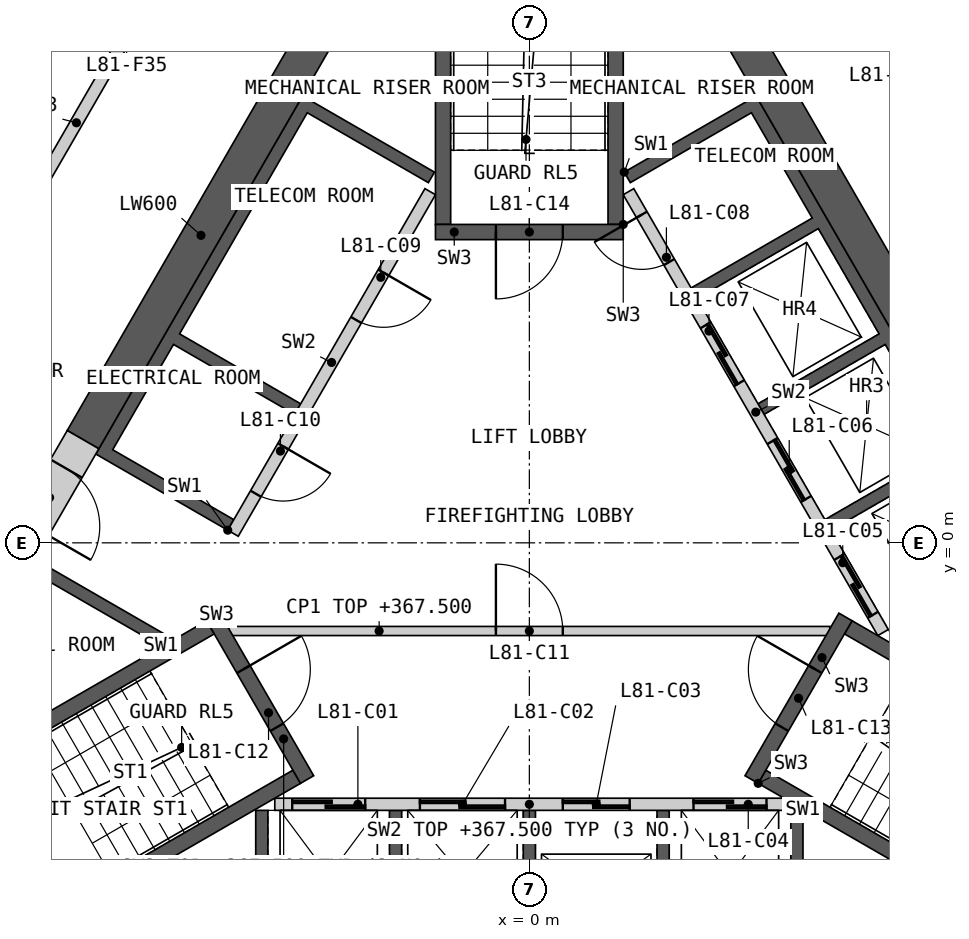
"""IFC4 building model, lengths in metres.
Left out: names, types, materials, properties, quantities, classifications, styles, units other than length and angle.
Written with IfcOpenShell. Run it as: python <this file> out.ifc"""

import sys

from ifc_helpers import new_model, si_unit, direction, frame, frame_2d, origin, place, context, subcontext, project, spatial, polyline, rectangle, outline, extrude, element, fill, save


model = new_model("IFC4")
c1 = context("Model", 3, precision=1e-05, world=origin(), true_north=direction((0.0, 1.0)))
c2 = subcontext(c1, "Body", "Model", "MODEL_VIEW")
j1 = project(units=[si_unit("LENGTHUNIT", "METRE"), si_unit("PLANEANGLEUNIT", "RADIAN")], contexts=[c1])
p1 = place(None, origin())
s1 = spatial("IfcSite", under=j1, at=p1, CompositionType="ELEMENT")
p2 = place(p1, origin())
s2 = spatial("IfcBuilding", under=s1, at=p2, CompositionType="ELEMENT")
p3 = place(p2, frame((0.0, 0.0, 364.4)))
s3 = spatial("IfcBuildingStorey", under=s2, at=p3, CompositionType="ELEMENT", Elevation=364.4)
p4 = place(p3, origin())
e1 = element("IfcWall", 1, at=p4, inside=s3, PredefinedType="SHEAR", context=c2, shape_type="SweptSolid", body=[
    extrude(outline(polyline([(4.5, -4.4), (4.5, -6.906), (-4.5, -6.906), (-4.5, -4.4), (-4.3, -4.4), (-4.3, -6.7), (-2.3, -6.7), (-2.3, -4.4), (-2.1, -4.4), (-2.1, -6.7), (-0.1, -6.7), (-0.1, -4.4), (0.1, -4.4), (0.1, -6.7), (2.1, -6.7), (2.1, -4.4), (2.3, -4.4), (2.3, -6.7), (4.3, -6.7), (4.3, -4.4), (4.5, -4.4)])), origin(), (0.0, 0.0, 1.0), 3.1),
])
p5 = place(p3, frame((-4.187, -4.3, 0.0), z_axis=(0.0, 0.0, 1.0), x_axis=(1.0, 0.0, 0.0)))
e2 = element("IfcWall", 2, at=p5, inside=s3, PredefinedType="SOLIDWALL", context=c2, shape_type="SweptSolid", body=[
    extrude(rectangle(XDim=8.373, YDim=0.2, at=frame_2d((4.187, 0.0))), origin(), (0.0, 0.0, 1.0), 3.1),
])
p6 = place(p5, frame((0.287, 0.0, 0.0)))
e3 = element("IfcOpeningElement", 3, at=p6, cuts=e2, PredefinedType="OPENING", context=c2, shape_type="SweptSolid", body=[
    extrude(rectangle(XDim=1.2, YDim=2.1, at=frame_2d((0.6, 1.05))), frame((0.0, 0.11, 0.0), z_axis=(0.0, -1.0, 0.0), x_axis=(1.0, 0.0, 0.0)), (0.0, 0.0, 1.0), 0.22),
])
p7 = place(p5, frame((2.387, 0.0, 0.0)))
e4 = element("IfcOpeningElement", 4, at=p7, cuts=e2, PredefinedType="OPENING", context=c2, shape_type="SweptSolid", body=[
    extrude(rectangle(XDim=1.4, YDim=2.1, at=frame_2d((0.7, 1.05))), frame((0.0, 0.11, 0.0), z_axis=(0.0, -1.0, 0.0), x_axis=(1.0, 0.0, 0.0)), (0.0, 0.0, 1.0), 0.22),
])
p8 = place(p5, frame((4.737, 0.0, 0.0)))
e5 = element("IfcOpeningElement", 5, at=p8, cuts=e2, PredefinedType="OPENING", context=c2, shape_type="SweptSolid", body=[
    extrude(rectangle(XDim=1.1, YDim=2.1, at=frame_2d((0.55, 1.05))), frame((0.0, 0.11, 0.0), z_axis=(0.0, -1.0, 0.0), x_axis=(1.0, 0.0, 0.0)), (0.0, 0.0, 1.0), 0.22),
])
p9 = place(p5, frame((6.887, 0.0, 0.0)))
e6 = element("IfcOpeningElement", 6, at=p9, cuts=e2, PredefinedType="OPENING", context=c2, shape_type="SweptSolid", body=[
    extrude(rectangle(XDim=1.2, YDim=2.1, at=frame_2d((0.6, 1.05))), frame((0.0, 0.11, 0.0), z_axis=(0.0, -1.0, 0.0), x_axis=(1.0, 0.0, 0.0)), (0.0, 0.0, 1.0), 0.22),
])
p10 = place(p3, origin())
e7 = element("IfcWall", 7, at=p10, inside=s3, PredefinedType="SHEAR", context=c2, shape_type="SweptSolid", body=[
    extrude(outline(polyline([(1.561, 6.097), (3.731, 7.35), (8.231, -0.444), (6.061, -1.697), (5.96, -1.524), (7.952, -0.374), (6.952, 1.358), (4.96, 0.208), (4.861, 0.381), (6.852, 1.531), (5.852, 3.263), (3.861, 2.113), (3.76, 2.287), (5.752, 3.437), (4.752, 5.169), (2.76, 4.019), (2.66, 4.192), (4.652, 5.342), (3.652, 7.074), (1.66, 5.924), (1.561, 6.097)])), origin(), (0.0, 0.0, 1.0), 3.1),
])
p11 = place(p3, frame((5.817, -1.476, 0.0), z_axis=(0.0, 0.0, 1.0), x_axis=(-0.500002616675, 0.866023893041, 0.0)))
e8 = element("IfcWall", 8, at=p11, inside=s3, PredefinedType="SOLIDWALL", context=c2, shape_type="SweptSolid", body=[
    extrude(rectangle(XDim=8.373, YDim=0.2, at=frame_2d((4.187, 0.0))), origin(), (0.0, 0.0, 1.0), 3.1),
])
p12 = place(p11, frame((0.337, 0.0, 0.0)))
e9 = element("IfcOpeningElement", 9, at=p12, cuts=e8, PredefinedType="OPENING", context=c2, shape_type="SweptSolid", body=[
    extrude(rectangle(XDim=1.1, YDim=2.1, at=frame_2d((0.55, 1.05))), frame((0.0, 0.11, 0.0), z_axis=(0.0, -1.0, 0.0), x_axis=(1.0, 0.0, 0.0)), (0.0, 0.0, 1.0), 0.22),
])
p13 = place(p11, frame((2.537, 0.0, 0.0)))
e10 = element("IfcOpeningElement", 10, at=p13, cuts=e8, PredefinedType="OPENING", context=c2, shape_type="SweptSolid", body=[
    extrude(rectangle(XDim=1.1, YDim=2.1, at=frame_2d((0.55, 1.05))), frame((0.0, 0.11, 0.0), z_axis=(0.0, -1.0, 0.0), x_axis=(1.0, 0.0, 0.0)), (0.0, 0.0, 1.0), 0.22),
])
p14 = place(p11, frame((4.737, 0.0, 0.0)))
e11 = element("IfcOpeningElement", 11, at=p14, cuts=e8, PredefinedType="OPENING", context=c2, shape_type="SweptSolid", body=[
    extrude(rectangle(XDim=1.1, YDim=2.1, at=frame_2d((0.55, 1.05))), frame((0.0, 0.11, 0.0), z_axis=(0.0, -1.0, 0.0), x_axis=(1.0, 0.0, 0.0)), (0.0, 0.0, 1.0), 0.22),
])
p15 = place(p11, frame((7.037, 0.0, 0.0)))
e12 = element("IfcOpeningElement", 12, at=p15, cuts=e8, PredefinedType="OPENING", context=c2, shape_type="SweptSolid", body=[
    extrude(rectangle(XDim=0.9, YDim=2.1, at=frame_2d((0.45, 1.05))), frame((0.0, 0.11, 0.0), z_axis=(0.0, -1.0, 0.0), x_axis=(1.0, 0.0, 0.0)), (0.0, 0.0, 1.0), 0.22),
])
p16 = place(p3, origin())
e13 = element("IfcWall", 13, at=p16, inside=s3, PredefinedType="SHEAR", context=c2, shape_type="SweptSolid", body=[
    extrude(outline(polyline([(-6.061, -1.697), (-8.231, -0.444), (-8.131, -0.271), (-5.96, -1.524), (-6.061, -1.697)])), origin(), (0.0, 0.0, 1.0), 3.1),
])
p17 = place(p3, origin())
e14 = element("IfcWall", 14, at=p17, inside=s3, PredefinedType="SHEAR", context=c2, shape_type="SweptSolid", body=[
    extrude(outline(polyline([(-4.96, 0.208), (-7.131, 1.461), (-3.731, 7.35), (-1.561, 6.097), (-1.66, 5.924), (-3.652, 7.074), (-5.752, 3.437), (-3.76, 2.287), (-3.861, 2.113), (-5.852, 3.263), (-6.852, 1.531), (-4.861, 0.381), (-4.96, 0.208)])), origin(), (0.0, 0.0, 1.0), 3.1),
])
p18 = place(p3, frame((-1.631, 5.776, 0.0), z_axis=(0.0, 0.0, 1.0), x_axis=(-0.499992876559, -0.866029516466, 0.0)))
e15 = element("IfcWall", 15, at=p18, inside=s3, PredefinedType="SOLIDWALL", context=c2, shape_type="SweptSolid", body=[
    extrude(rectangle(XDim=6.486, YDim=0.2, at=frame_2d((3.243, 0.0))), origin(), (0.0, 0.0, 1.0), 3.1),
])
p19 = place(p18, frame((1.537, 0.0, 0.0)))
e16 = element("IfcOpeningElement", 16, at=p19, cuts=e15, PredefinedType="OPENING", context=c2, shape_type="SweptSolid", body=[
    extrude(rectangle(XDim=0.9, YDim=2.1, at=frame_2d((0.45, 1.05))), frame((0.0, 0.11, 0.0), z_axis=(0.0, -1.0, 0.0), x_axis=(1.0, 0.0, 0.0)), (0.0, 0.0, 1.0), 0.22),
])
p20 = place(p18, frame((4.837, 0.0, 0.0)))
e17 = element("IfcOpeningElement", 17, at=p20, cuts=e15, PredefinedType="OPENING", context=c2, shape_type="SweptSolid", body=[
    extrude(rectangle(XDim=0.9, YDim=2.1, at=frame_2d((0.45, 1.05))), frame((0.0, 0.11, 0.0), z_axis=(0.0, -1.0, 0.0), x_axis=(1.0, 0.0, 0.0)), (0.0, 0.0, 1.0), 0.22),
])
p21 = place(p3, frame((-4.941, -1.45, 0.0), z_axis=(0.0, 0.0, 1.0), x_axis=(1.0, 0.0, 0.0)))
e18 = element("IfcWall", 18, at=p21, inside=s3, PredefinedType="PARTITIONING", context=c2, shape_type="SweptSolid", body=[
    extrude(rectangle(XDim=9.882, YDim=0.15, at=frame_2d((4.941, 0.0))), origin(), (0.0, 0.0, 1.0), 3.1),
])
p22 = place(p21, frame((4.391, 0.0, 0.0)))
e19 = element("IfcOpeningElement", 19, at=p22, cuts=e18, PredefinedType="OPENING", context=c2, shape_type="SweptSolid", body=[
    extrude(rectangle(XDim=1.1, YDim=2.1, at=frame_2d((0.55, 1.05))), frame((0.0, 0.085, 0.0), z_axis=(0.0, -1.0, 0.0), x_axis=(1.0, 0.0, 0.0)), (0.0, 0.0, 1.0), 0.17),
])
p23 = place(p3, origin())
e20 = element("IfcWall", 20, at=p23, inside=s3, PredefinedType="SHEAR", context=c2, shape_type="SweptSolid", body=[
    extrude(outline(polyline([(-5.307, -1.281), (-10.374, -4.206), (-10.032, -4.298), (-5.182, -1.498), (-5.307, -1.281)])), origin(), (0.0, 0.0, 1.0), 3.1),
])
p24 = place(p3, origin())
e21 = element("IfcWall", 21, at=p24, inside=s3, PredefinedType="SHEAR", context=c2, shape_type="SweptSolid", body=[
    extrude(outline(polyline([(-8.738, -6.539), (-8.83, -6.881), (-3.763, -3.956), (-3.888, -3.739), (-8.738, -6.539)])), origin(), (0.0, 0.0, 1.0), 3.1),
])
p25 = place(p3, frame((-5.199, -1.219, 0.0), z_axis=(0.0, 0.0, 1.0), x_axis=(0.499982516597, -0.866035497597, 0.0)))
e22 = element("IfcWall", 22, at=p25, inside=s3, PredefinedType="SHEAR", context=c2, shape_type="SweptSolid", body=[
    extrude(rectangle(XDim=3.088, YDim=0.25, at=frame_2d((1.544, 0.0))), origin(), (0.0, 0.0, 1.0), 3.1),
])
p26 = place(p25, frame((0.994, 0.0, 0.0)))
e23 = element("IfcOpeningElement", 23, at=p26, cuts=e22, PredefinedType="OPENING", context=c2, shape_type="SweptSolid", body=[
    extrude(rectangle(XDim=1.1, YDim=2.1, at=frame_2d((0.55, 1.05))), frame((0.0, 0.135, 0.0), z_axis=(0.0, -1.0, 0.0), x_axis=(1.0, 0.0, 0.0)), (0.0, 0.0, 1.0), 0.27),
])
p27 = place(p3, origin())
e24 = element("IfcWall", 24, at=p27, inside=s3, PredefinedType="SHEAR", context=c2, shape_type="SweptSolid", body=[
    extrude(outline(polyline([(3.763, -3.956), (8.83, -6.881), (8.738, -6.539), (3.888, -3.739), (3.763, -3.956)])), origin(), (0.0, 0.0, 1.0), 3.1),
])
p28 = place(p3, origin())
e25 = element("IfcWall", 25, at=p28, inside=s3, PredefinedType="SHEAR", context=c2, shape_type="SweptSolid", body=[
    extrude(outline(polyline([(10.032, -4.298), (10.374, -4.206), (5.307, -1.281), (5.182, -1.498), (10.032, -4.298)])), origin(), (0.0, 0.0, 1.0), 3.1),
])
p29 = place(p3, frame((3.655, -3.893, 0.0), z_axis=(0.0, 0.0, 1.0), x_axis=(0.499982516597, 0.866035497597, 0.0)))
e26 = element("IfcWall", 26, at=p29, inside=s3, PredefinedType="SHEAR", context=c2, shape_type="SweptSolid", body=[
    extrude(rectangle(XDim=3.088, YDim=0.25, at=frame_2d((1.544, 0.0))), origin(), (0.0, 0.0, 1.0), 3.1),
])
p30 = place(p29, frame((0.994, 0.0, 0.0)))
e27 = element("IfcOpeningElement", 27, at=p30, cuts=e26, PredefinedType="OPENING", context=c2, shape_type="SweptSolid", body=[
    extrude(rectangle(XDim=1.1, YDim=2.1, at=frame_2d((0.55, 1.05))), frame((0.0, 0.135, 0.0), z_axis=(0.0, -1.0, 0.0), x_axis=(1.0, 0.0, 0.0)), (0.0, 0.0, 1.0), 0.27),
])
p31 = place(p3, origin())
e28 = element("IfcWall", 28, at=p31, inside=s3, PredefinedType="SHEAR", context=c2, shape_type="SweptSolid", body=[
    extrude(outline(polyline([(1.544, 5.237), (1.544, 11.087), (1.294, 10.837), (1.294, 5.237), (1.544, 5.237)])), origin(), (0.0, 0.0, 1.0), 3.1),
])
p32 = place(p3, origin())
e29 = element("IfcWall", 29, at=p32, inside=s3, PredefinedType="SHEAR", context=c2, shape_type="SweptSolid", body=[
    extrude(outline(polyline([(-1.294, 10.837), (-1.544, 11.087), (-1.544, 5.237), (-1.294, 5.237), (-1.294, 10.837)])), origin(), (0.0, 0.0, 1.0), 3.1),
])
p33 = place(p3, frame((1.544, 5.112, 0.0), z_axis=(0.0, 0.0, 1.0), x_axis=(-1.0, 0.0, 0.0)))
e30 = element("IfcWall", 30, at=p33, inside=s3, PredefinedType="SHEAR", context=c2, shape_type="SweptSolid", body=[
    extrude(rectangle(XDim=3.088, YDim=0.25, at=frame_2d((1.544, 0.0))), origin(), (0.0, 0.0, 1.0), 3.1),
])
p34 = place(p33, frame((0.994, 0.0, 0.0)))
e31 = element("IfcOpeningElement", 31, at=p34, cuts=e30, PredefinedType="OPENING", context=c2, shape_type="SweptSolid", body=[
    extrude(rectangle(XDim=1.1, YDim=2.1, at=frame_2d((0.55, 1.05))), frame((0.0, 0.135, 0.0), z_axis=(0.0, -1.0, 0.0), x_axis=(1.0, 0.0, 0.0)), (0.0, 0.0, 1.0), 0.27),
])
p35 = place(p3, frame((8.686, -0.634, 0.0), z_axis=(0.0, 0.0, 1.0), x_axis=(-0.50001836461, 0.866014800712, 0.0)))
e32 = element("IfcWall", 32, at=p35, inside=s3, PredefinedType="SHEAR", context=c2, shape_type="SweptSolid", body=[
    extrude(rectangle(XDim=10.451, YDim=0.6, at=frame_2d((5.225, 0.0))), origin(), (0.0, 0.0, 1.0), 3.1),
])
p36 = place(p3, frame((-3.461, 8.417, 0.0), z_axis=(0.0, 0.0, 1.0), x_axis=(-0.50000391502, -0.866023143435, 0.0)))
e33 = element("IfcWall", 33, at=p36, inside=s3, PredefinedType="SHEAR", context=c2, shape_type="SweptSolid", body=[
    extrude(rectangle(XDim=7.759, YDim=0.6, at=frame_2d((3.879, 0.0))), origin(), (0.0, 0.0, 1.0), 3.1),
])
p37 = place(p3, frame((-7.34, 1.698, 0.0), z_axis=(0.0, 0.0, 1.0), x_axis=(-0.50002983664, -0.866008176907, 0.0)))
e34 = element("IfcWall", 34, at=p37, inside=s3, PredefinedType="SHEAR", context=c2, shape_type="SweptSolid", body=[
    extrude(rectangle(XDim=2.2, YDim=0.6, at=frame_2d((1.1, 0.0))), origin(), (0.0, 0.0, 1.0), 3.1),
])
p38 = place(p37, frame((0.55, 0.0, 0.0)))
e35 = element("IfcOpeningElement", 35, at=p38, cuts=e34, PredefinedType="OPENING", context=c2, shape_type="SweptSolid", body=[
    extrude(rectangle(XDim=1.1, YDim=2.1, at=frame_2d((0.55, 1.05))), frame((0.0, 0.31, 0.0), z_axis=(0.0, -1.0, 0.0), x_axis=(1.0, 0.0, 0.0)), (0.0, 0.0, 1.0), 0.62),
])
p39 = place(p3, frame((-8.465, 5.15, 0.0), z_axis=(0.0, 0.0, 1.0), x_axis=(0.499992155518, 0.866029932751, 0.0)))
e36 = element("IfcWall", 36, at=p39, inside=s3, PredefinedType="PARTITIONING", context=c2, shape_type="SweptSolid", body=[
    extrude(rectangle(XDim=8.123, YDim=0.2, at=frame_2d((4.062, 0.0))), origin(), (0.0, 0.0, 1.0), 3.1),
])
p40 = place(p39, frame((3.587, 0.0, 0.0)))
e37 = element("IfcOpeningElement", 37, at=p40, cuts=e36, PredefinedType="OPENING", context=c2, shape_type="SweptSolid", body=[
    extrude(rectangle(XDim=0.95, YDim=2.1, at=frame_2d((0.475, 1.05))), frame((0.0, 0.11, 0.0), z_axis=(0.0, -1.0, 0.0), x_axis=(1.0, 0.0, 0.0)), (0.0, 0.0, 1.0), 0.22),
])
p41 = place(p3, frame((4.403, 12.185, 0.0), z_axis=(0.0, 0.0, 1.0), x_axis=(0.499992155518, -0.866029932751, 0.0)))
e38 = element("IfcWall", 38, at=p41, inside=s3, PredefinedType="PARTITIONING", context=c2, shape_type="SweptSolid", body=[
    extrude(rectangle(XDim=8.123, YDim=0.2, at=frame_2d((4.062, 0.0))), origin(), (0.0, 0.0, 1.0), 3.1),
])
p42 = place(p41, frame((3.762, 0.0, 0.0)))
e39 = element("IfcOpeningElement", 39, at=p42, cuts=e38, PredefinedType="OPENING", context=c2, shape_type="SweptSolid", body=[
    extrude(rectangle(XDim=1.0, YDim=2.1, at=frame_2d((0.5, 1.05))), frame((0.0, 0.11, 0.0), z_axis=(0.0, -1.0, 0.0), x_axis=(1.0, 0.0, 0.0)), (0.0, 0.0, 1.0), 0.22),
])
p43 = place(p3, frame((-11.473, 6.74, 0.0), z_axis=(0.0, 0.0, 1.0), x_axis=(0.499993542657, 0.866029131901, 0.0)))
e40 = element("IfcWall", 40, at=p43, inside=s3, PredefinedType="PARTITIONING", context=c2, shape_type="SweptSolid", body=[
    extrude(rectangle(XDim=14.994, YDim=0.2, at=frame_2d((7.497, 0.0))), origin(), (0.0, 0.0, 1.0), 2.33),
])
p44 = place(p43, frame((10.383, 0.0, 0.0)))
e41 = element("IfcOpeningElement", 41, at=p44, cuts=e40, PredefinedType="OPENING", context=c2, shape_type="SweptSolid", body=[
    extrude(rectangle(XDim=0.95, YDim=2.1, at=frame_2d((0.475, 1.05))), frame((0.0, 0.11, 0.0), z_axis=(0.0, -1.0, 0.0), x_axis=(1.0, 0.0, 0.0)), (0.0, 0.0, 1.0), 0.22),
])
p45 = place(p6, origin())
e42 = element("IfcDoor", 42, at=p45, inside=s3, OperationType="SLIDING_TO_LEFT", PredefinedType="DOOR", context=c2, shape_type="SweptSolid", body=[
    extrude(rectangle(XDim=1.2, YDim=2.1, at=frame_2d((0.6, 1.05))), frame((0.0, 0.025, 0.0), z_axis=(0.0, -1.0, 0.0), x_axis=(1.0, 0.0, 0.0)), (0.0, 0.0, 1.0), 0.05),
])
fill(e3, e42)
p46 = place(p7, origin())
e43 = element("IfcDoor", 43, at=p46, inside=s3, OperationType="SLIDING_TO_LEFT", PredefinedType="DOOR", context=c2, shape_type="SweptSolid", body=[
    extrude(rectangle(XDim=1.4, YDim=2.1, at=frame_2d((0.7, 1.05))), frame((0.0, 0.025, 0.0), z_axis=(0.0, -1.0, 0.0), x_axis=(1.0, 0.0, 0.0)), (0.0, 0.0, 1.0), 0.05),
])
fill(e4, e43)
p47 = place(p8, origin())
e44 = element("IfcDoor", 44, at=p47, inside=s3, OperationType="SLIDING_TO_LEFT", PredefinedType="DOOR", context=c2, shape_type="SweptSolid", body=[
    extrude(rectangle(XDim=1.1, YDim=2.1, at=frame_2d((0.55, 1.05))), frame((0.0, 0.025, 0.0), z_axis=(0.0, -1.0, 0.0), x_axis=(1.0, 0.0, 0.0)), (0.0, 0.0, 1.0), 0.05),
])
fill(e5, e44)
p48 = place(p9, origin())
e45 = element("IfcDoor", 45, at=p48, inside=s3, OperationType="SLIDING_TO_LEFT", PredefinedType="DOOR", context=c2, shape_type="SweptSolid", body=[
    extrude(rectangle(XDim=1.2, YDim=2.1, at=frame_2d((0.6, 1.05))), frame((0.0, 0.025, 0.0), z_axis=(0.0, -1.0, 0.0), x_axis=(1.0, 0.0, 0.0)), (0.0, 0.0, 1.0), 0.05),
])
fill(e6, e45)
p49 = place(p12, origin())
e46 = element("IfcDoor", 46, at=p49, inside=s3, OperationType="SLIDING_TO_LEFT", PredefinedType="DOOR", context=c2, shape_type="SweptSolid", body=[
    extrude(rectangle(XDim=1.1, YDim=2.1, at=frame_2d((0.55, 1.05))), frame((0.0, 0.025, 0.0), z_axis=(0.0, -1.0, 0.0), x_axis=(1.0, 0.0, 0.0)), (0.0, 0.0, 1.0), 0.05),
])
fill(e9, e46)
p50 = place(p13, origin())
e47 = element("IfcDoor", 47, at=p50, inside=s3, OperationType="SLIDING_TO_LEFT", PredefinedType="DOOR", context=c2, shape_type="SweptSolid", body=[
    extrude(rectangle(XDim=1.1, YDim=2.1, at=frame_2d((0.55, 1.05))), frame((0.0, 0.025, 0.0), z_axis=(0.0, -1.0, 0.0), x_axis=(1.0, 0.0, 0.0)), (0.0, 0.0, 1.0), 0.05),
])
fill(e10, e47)
p51 = place(p14, origin())
e48 = element("IfcDoor", 48, at=p51, inside=s3, OperationType="SLIDING_TO_LEFT", PredefinedType="DOOR", context=c2, shape_type="SweptSolid", body=[
    extrude(rectangle(XDim=1.1, YDim=2.1, at=frame_2d((0.55, 1.05))), frame((0.0, 0.025, 0.0), z_axis=(0.0, -1.0, 0.0), x_axis=(1.0, 0.0, 0.0)), (0.0, 0.0, 1.0), 0.05),
])
fill(e11, e48)
p52 = place(p15, origin())
e49 = element("IfcDoor", 49, at=p52, inside=s3, OperationType="SINGLE_SWING_RIGHT", PredefinedType="DOOR", context=c2, shape_type="SweptSolid", body=[
    extrude(rectangle(XDim=0.9, YDim=2.1, at=frame_2d((0.45, 1.05))), frame((0.0, 0.025, 0.0), z_axis=(0.0, -1.0, 0.0), x_axis=(1.0, 0.0, 0.0)), (0.0, 0.0, 1.0), 0.05),
])
fill(e12, e49)
p53 = place(p19, origin())
e50 = element("IfcDoor", 50, at=p53, inside=s3, OperationType="SINGLE_SWING_LEFT", PredefinedType="DOOR", context=c2, shape_type="SweptSolid", body=[
    extrude(rectangle(XDim=0.9, YDim=2.1, at=frame_2d((0.45, 1.05))), frame((0.0, 0.025, 0.0), z_axis=(0.0, -1.0, 0.0), x_axis=(1.0, 0.0, 0.0)), (0.0, 0.0, 1.0), 0.05),
])
fill(e16, e50)
p54 = place(p20, origin())
e51 = element("IfcDoor", 51, at=p54, inside=s3, OperationType="SINGLE_SWING_LEFT", PredefinedType="DOOR", context=c2, shape_type="SweptSolid", body=[
    extrude(rectangle(XDim=0.9, YDim=2.1, at=frame_2d((0.45, 1.05))), frame((0.0, 0.025, 0.0), z_axis=(0.0, -1.0, 0.0), x_axis=(1.0, 0.0, 0.0)), (0.0, 0.0, 1.0), 0.05),
])
fill(e17, e51)
p55 = place(p22, origin())
e52 = element("IfcDoor", 52, at=p55, inside=s3, OperationType="SINGLE_SWING_LEFT", PredefinedType="DOOR", context=c2, shape_type="SweptSolid", body=[
    extrude(rectangle(XDim=1.1, YDim=2.1, at=frame_2d((0.55, 1.05))), frame((0.0, 0.025, 0.0), z_axis=(0.0, -1.0, 0.0), x_axis=(1.0, 0.0, 0.0)), (0.0, 0.0, 1.0), 0.05),
])
fill(e19, e52)
p56 = place(p26, origin())
e53 = element("IfcDoor", 53, at=p56, inside=s3, OperationType="SINGLE_SWING_LEFT", PredefinedType="DOOR", context=c2, shape_type="SweptSolid", body=[
    extrude(rectangle(XDim=1.1, YDim=2.1, at=frame_2d((0.55, 1.05))), frame((0.0, 0.025, 0.0), z_axis=(0.0, -1.0, 0.0), x_axis=(1.0, 0.0, 0.0)), (0.0, 0.0, 1.0), 0.05),
])
fill(e23, e53)
p57 = place(p30, origin())
e54 = element("IfcDoor", 54, at=p57, inside=s3, OperationType="SINGLE_SWING_RIGHT", PredefinedType="DOOR", context=c2, shape_type="SweptSolid", body=[
    extrude(rectangle(XDim=1.1, YDim=2.1, at=frame_2d((0.55, 1.05))), frame((0.0, 0.025, 0.0), z_axis=(0.0, -1.0, 0.0), x_axis=(1.0, 0.0, 0.0)), (0.0, 0.0, 1.0), 0.05),
])
fill(e27, e54)
p58 = place(p34, origin())
e55 = element("IfcDoor", 55, at=p58, inside=s3, OperationType="SINGLE_SWING_RIGHT", PredefinedType="DOOR", context=c2, shape_type="SweptSolid", body=[
    extrude(rectangle(XDim=1.1, YDim=2.1, at=frame_2d((0.55, 1.05))), frame((0.0, 0.025, 0.0), z_axis=(0.0, -1.0, 0.0), x_axis=(1.0, 0.0, 0.0)), (0.0, 0.0, 1.0), 0.05),
])
fill(e31, e55)
p59 = place(p38, origin())
e56 = element("IfcDoor", 56, at=p59, inside=s3, OperationType="SINGLE_SWING_RIGHT", PredefinedType="DOOR", context=c2, shape_type="SweptSolid", body=[
    extrude(rectangle(XDim=1.1, YDim=2.1, at=frame_2d((0.55, 1.05))), frame((0.0, 0.055, 0.0), z_axis=(0.0, -1.0, 0.0), x_axis=(1.0, 0.0, 0.0)), (0.0, 0.0, 1.0), 0.05),
])
fill(e35, e56)
save(model, sys.argv[1])
